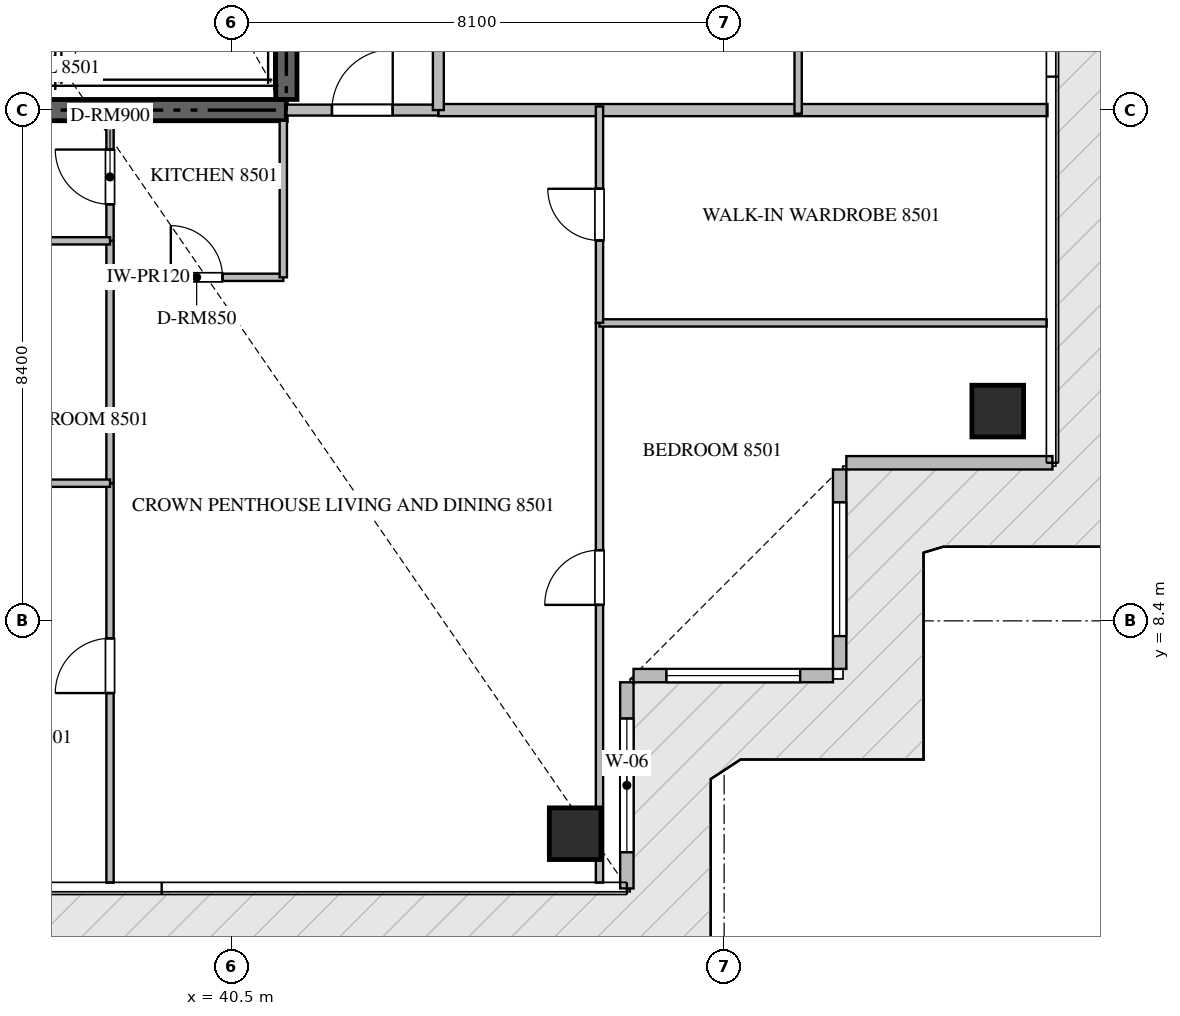
"""IFC4 building model, lengths in metres.
Left out: names, types, materials, properties, quantities, classifications, styles, units other than length and angle.
Written with IfcOpenShell. Run it as: python <this file> out.ifc"""

import sys

from ifc_helpers import new_model, si_unit, direction, frame, frame_2d, origin, origin_2d, place, context, subcontext, project, spatial, rectangle, extrude, source, transform, mapped, element, fill, save


model = new_model("IFC4")
c1 = context("Model", 3, precision=1e-05, world=origin(), true_north=direction((0.0, 1.0)))
c2 = subcontext(c1, "Body", "Model", "MODEL_VIEW")
j1 = project(units=[si_unit("LENGTHUNIT", "METRE"), si_unit("PLANEANGLEUNIT", "RADIAN")], contexts=[c1])
p1 = place(None, origin())
s1 = spatial("IfcSite", under=j1, at=p1, CompositionType="ELEMENT")
p2 = place(p1, origin())
s2 = spatial("IfcBuilding", under=s1, at=p2, CompositionType="ELEMENT")
p3 = place(p2, frame((0.0, 0.0, 342.05)))
s3 = spatial("IfcBuildingStorey", under=s2, at=p3, CompositionType="ELEMENT", Elevation=342.05)
p4 = place(p3, frame((23.4, 16.8, -0.26), z_axis=(0.0, 0.0, 1.0), x_axis=(1.0, 0.0, 0.0)))
e1 = element("IfcWall", 1, at=p4, inside=s3, PredefinedType="SHEAR", context=c2, shape_type="SweptSolid", body=[
    extrude(rectangle(XDim=18.0, YDim=0.35, at=frame_2d((9.0, 0.0))), origin(), (0.0, 0.0, 1.0), 5.898),
])
p5 = place(p3, frame((41.4, 16.975, -0.26), z_axis=(0.0, 0.0, 1.0), x_axis=(0.0, 1.0, 0.0)))
e2 = element("IfcWall", 2, at=p5, inside=s3, PredefinedType="SHEAR", context=c2, shape_type="SweptSolid", body=[
    extrude(rectangle(XDim=8.375, YDim=0.35, at=frame_2d((4.188, 0.0))), origin(), (0.0, 0.0, 1.0), 5.898),
])
m1 = source(origin(), c2, "Body", "SweptSolid", [
    extrude(rectangle(XDim=0.85, YDim=0.85, at=origin_2d()), origin(), (0.0, 0.0, 1.0), 5.9),
])
for number, where, z_axis, x_axis in (
    (3, (46.15, 4.9, -0.26), (0.0, 0.0, 1.0), (1.0, 0.0, 0.0)),
    (4, (53.1, 11.85, -0.26), (0.0, 0.0, 1.0), (1.0, 0.0, 0.0)),
):
    element("IfcColumn", number, at=place(p3, frame(where, z_axis=z_axis, x_axis=x_axis)), inside=s3, PredefinedType="COLUMN", context=c2, shape_type="MappedRepresentation", body=[
        mapped(m1, transform((0.0, 0.0, 0.0), scale=1.0)),
    ])
p6 = place(p3, frame((47.0, 4.0, 0.0), z_axis=(0.0, 0.0, 1.0), x_axis=(0.0, 1.0, 0.0)))
e5 = element("IfcWall", 5, at=p6, inside=s3, PredefinedType="ELEMENTEDWALL", context=c2, shape_type="SweptSolid", body=[
    extrude(rectangle(XDim=3.39, YDim=0.22, at=frame_2d((1.695, 0.0))), origin(), (0.0, 0.0, 1.0), 5.625),
])
p7 = place(p6, frame((0.595, 0.0, 0.65)))
e6 = element("IfcOpeningElement", 6, at=p7, cuts=e5, PredefinedType="OPENING", context=c2, shape_type="SweptSolid", body=[
    extrude(rectangle(XDim=2.2, YDim=2.4, at=frame_2d((1.1, 1.2))), frame((0.0, 0.12, 0.0), z_axis=(0.0, -1.0, 0.0), x_axis=(1.0, 0.0, 0.0)), (0.0, 0.0, 1.0), 0.24),
])
p8 = place(p3, frame((47.11, 7.5, 0.0), z_axis=(0.0, 0.0, 1.0), x_axis=(1.0, 0.0, 0.0)))
e7 = element("IfcWall", 7, at=p8, inside=s3, PredefinedType="ELEMENTEDWALL", context=c2, shape_type="SweptSolid", body=[
    extrude(rectangle(XDim=3.28, YDim=0.22, at=frame_2d((1.64, 0.0))), origin(), (0.0, 0.0, 1.0), 5.625),
])
p9 = place(p8, frame((0.54, 0.0, 0.65)))
e8 = element("IfcOpeningElement", 8, at=p9, cuts=e7, PredefinedType="OPENING", context=c2, shape_type="SweptSolid", body=[
    extrude(rectangle(XDim=2.2, YDim=2.4, at=frame_2d((1.1, 1.2))), frame((0.0, 0.12, 0.0), z_axis=(0.0, -1.0, 0.0), x_axis=(1.0, 0.0, 0.0)), (0.0, 0.0, 1.0), 0.24),
])
p10 = place(p3, frame((50.5, 7.61, 0.0), z_axis=(0.0, 0.0, 1.0), x_axis=(0.0, 1.0, 0.0)))
e9 = element("IfcWall", 9, at=p10, inside=s3, PredefinedType="ELEMENTEDWALL", context=c2, shape_type="SweptSolid", body=[
    extrude(rectangle(XDim=3.28, YDim=0.22, at=frame_2d((1.64, 0.0))), origin(), (0.0, 0.0, 1.0), 5.625),
])
p11 = place(p10, frame((0.54, 0.0, 0.65)))
e10 = element("IfcOpeningElement", 10, at=p11, cuts=e9, PredefinedType="OPENING", context=c2, shape_type="SweptSolid", body=[
    extrude(rectangle(XDim=2.2, YDim=2.4, at=frame_2d((1.1, 1.2))), frame((0.0, 0.12, 0.0), z_axis=(0.0, -1.0, 0.0), x_axis=(1.0, 0.0, 0.0)), (0.0, 0.0, 1.0), 0.24),
])
p12 = place(p3, frame((50.61, 11.0, 0.0), z_axis=(0.0, 0.0, 1.0), x_axis=(1.0, 0.0, 0.0)))
e11 = element("IfcWall", 11, at=p12, inside=s3, PredefinedType="ELEMENTEDWALL", context=c2, shape_type="SweptSolid", body=[
    extrude(rectangle(XDim=3.39, YDim=0.22, at=frame_2d((1.695, 0.0))), origin(), (0.0, 0.0, 1.0), 5.625),
])
p13 = place(p3, frame((43.9, 16.8, 0.0), z_axis=(0.0, 0.0, 1.0), x_axis=(1.0, 0.0, 0.0)))
e12 = element("IfcWall", 12, at=p13, inside=s3, PredefinedType="PARTITIONING", context=c2, shape_type="SweptSolid", body=[
    extrude(rectangle(XDim=10.018, YDim=0.2, at=frame_2d((5.009, 0.0))), origin(), (0.0, 0.0, 1.0), 5.64),
])
p14 = place(p3, frame((41.402, 16.8, 0.0), z_axis=(0.0, 0.0, 1.0), x_axis=(1.0, 0.0, 0.0)))
e13 = element("IfcWall", 13, at=p14, inside=s3, PredefinedType="PARTITIONING", context=c2, shape_type="SweptSolid", body=[
    extrude(rectangle(XDim=2.496, YDim=0.18, at=frame_2d((1.248, 0.0))), origin(), (0.0, 0.0, 1.0), 5.64),
])
p15 = place(p14, frame((0.748, 0.0, 0.0)))
e14 = element("IfcOpeningElement", 14, at=p15, cuts=e13, PredefinedType="OPENING", context=c2, shape_type="SweptSolid", body=[
    extrude(rectangle(XDim=1.0, YDim=2.15, at=frame_2d((0.5, 1.075))), frame((0.0, 0.1, 0.0), z_axis=(0.0, -1.0, 0.0), x_axis=(1.0, 0.0, 0.0)), (0.0, 0.0, 1.0), 0.2),
])
p16 = place(p3, frame((43.9, 16.8, 0.0), z_axis=(0.0, 0.0, 1.0), x_axis=(0.0, 1.0, 0.0)))
e15 = element("IfcWall", 15, at=p16, inside=s3, PredefinedType="PARTITIONING", context=c2, shape_type="SweptSolid", body=[
    extrude(rectangle(XDim=16.8, YDim=0.18, at=frame_2d((8.4, 0.0))), origin(), (0.0, 0.0, 1.0), 5.64),
])
p17 = place(p16, frame((14.5, 0.0, 0.0)))
e16 = element("IfcOpeningElement", 16, at=p17, cuts=e15, PredefinedType="OPENING", context=c2, shape_type="SweptSolid", body=[
    extrude(rectangle(XDim=1.0, YDim=2.15, at=frame_2d((0.5, 1.075))), frame((0.0, 0.1, 0.0), z_axis=(0.0, -1.0, 0.0), x_axis=(1.0, 0.0, 0.0)), (0.0, 0.0, 1.0), 0.2),
])
p18 = place(p3, frame((38.5, 14.05, 0.0), z_axis=(0.0, 0.0, 1.0), x_axis=(1.0, 0.0, 0.0)))
e17 = element("IfcWall", 17, at=p18, inside=s3, PredefinedType="PARTITIONING", context=c2, shape_type="SweptSolid", body=[
    extrude(rectangle(XDim=2.85, YDim=0.12, at=frame_2d((1.425, 0.0))), origin(), (0.0, 0.0, 1.0), 5.64),
])
p19 = place(p18, frame((1.0, 0.0, 0.0)))
e18 = element("IfcOpeningElement", 18, at=p19, cuts=e17, PredefinedType="OPENING", context=c2, shape_type="SweptSolid", body=[
    extrude(rectangle(XDim=0.85, YDim=2.1, at=frame_2d((0.425, 1.05))), frame((0.0, 0.07, 0.0), z_axis=(0.0, -1.0, 0.0), x_axis=(1.0, 0.0, 0.0)), (0.0, 0.0, 1.0), 0.14),
])
p20 = place(p3, frame((41.35, 14.05, 0.0), z_axis=(0.0, 0.0, 1.0), x_axis=(0.0, 1.0, 0.0)))
e19 = element("IfcWall", 19, at=p20, inside=s3, PredefinedType="PARTITIONING", context=c2, shape_type="SweptSolid", body=[
    extrude(rectangle(XDim=2.575, YDim=0.12, at=frame_2d((1.288, 0.0))), origin(), (0.0, 0.0, 1.0), 5.64),
])
p21 = place(p3, frame((38.5, 14.65, 0.0), z_axis=(0.0, 0.0, 1.0), x_axis=(0.0, 1.0, 0.0)))
e20 = element("IfcWall", 20, at=p21, inside=s3, PredefinedType="PARTITIONING", context=c2, shape_type="SweptSolid", body=[
    extrude(rectangle(XDim=1.975, YDim=0.12, at=frame_2d((0.988, 0.0))), origin(), (0.0, 0.0, 1.0), 5.64),
])
p22 = place(p21, frame((0.601, 0.0, 0.0)))
e21 = element("IfcOpeningElement", 21, at=p22, cuts=e20, PredefinedType="OPENING", context=c2, shape_type="SweptSolid", body=[
    extrude(rectangle(XDim=0.9, YDim=2.1, at=frame_2d((0.45, 1.05))), frame((0.0, 0.07, 0.0), z_axis=(0.0, -1.0, 0.0), x_axis=(1.0, 0.0, 0.0)), (0.0, 0.0, 1.0), 0.14),
])
p23 = place(p3, frame((38.5, 4.095, 0.0), z_axis=(0.0, 0.0, 1.0), x_axis=(0.0, 1.0, 0.0)))
e22 = element("IfcWall", 22, at=p23, inside=s3, PredefinedType="PARTITIONING", context=c2, shape_type="SweptSolid", body=[
    extrude(rectangle(XDim=6.569, YDim=0.12, at=frame_2d((3.285, 0.0))), origin(), (0.0, 0.0, 1.0), 5.64),
])
p24 = place(p23, frame((3.118, 0.0, 0.0)))
e23 = element("IfcOpeningElement", 23, at=p24, cuts=e22, PredefinedType="OPENING", context=c2, shape_type="SweptSolid", body=[
    extrude(rectangle(XDim=0.9, YDim=2.1, at=frame_2d((0.45, 1.05))), frame((0.0, 0.07, 0.0), z_axis=(0.0, -1.0, 0.0), x_axis=(1.0, 0.0, 0.0)), (0.0, 0.0, 1.0), 0.14),
])
p25 = place(p3, frame((38.5, 10.666, 0.0), z_axis=(0.0, 0.0, 1.0), x_axis=(0.0, 1.0, 0.0)))
e24 = element("IfcWall", 24, at=p25, inside=s3, PredefinedType="PARTITIONING", context=c2, shape_type="SweptSolid", body=[
    extrude(rectangle(XDim=3.982, YDim=0.12, at=frame_2d((1.991, 0.0))), origin(), (0.0, 0.0, 1.0), 5.64),
])
p26 = place(p3, frame((33.35, 10.664, 0.0), z_axis=(0.0, 0.0, 1.0), x_axis=(1.0, 0.0, 0.0)))
e25 = element("IfcWall", 25, at=p26, inside=s3, PredefinedType="PARTITIONING", context=c2, shape_type="SweptSolid", body=[
    extrude(rectangle(XDim=5.15, YDim=0.12, at=frame_2d((2.575, 0.0))), origin(), (0.0, 0.0, 1.0), 5.64),
])
p27 = place(p3, frame((35.515, 14.65, 0.0), z_axis=(0.0, 0.0, 1.0), x_axis=(1.0, 0.0, 0.0)))
e26 = element("IfcWall", 26, at=p27, inside=s3, PredefinedType="PARTITIONING", context=c2, shape_type="SweptSolid", body=[
    extrude(rectangle(XDim=2.985, YDim=0.12, at=frame_2d((1.493, 0.0))), origin(), (0.0, 0.0, 1.0), 5.64),
])
p28 = place(p27, frame((1.067, 0.0, 0.0)))
e27 = element("IfcOpeningElement", 27, at=p28, cuts=e26, PredefinedType="OPENING", context=c2, shape_type="SweptSolid", body=[
    extrude(rectangle(XDim=0.85, YDim=2.1, at=frame_2d((0.425, 1.05))), frame((0.0, 0.07, 0.0), z_axis=(0.0, -1.0, 0.0), x_axis=(1.0, 0.0, 0.0)), (0.0, 0.0, 1.0), 0.14),
])
p29 = place(p3, frame((46.55, 4.095, 0.0), z_axis=(0.0, 0.0, 1.0), x_axis=(0.0, 1.0, 0.0)))
e28 = element("IfcWall", 28, at=p29, inside=s3, PredefinedType="PARTITIONING", context=c2, shape_type="SweptSolid", body=[
    extrude(rectangle(XDim=9.205, YDim=0.12, at=frame_2d((4.603, 0.0))), origin(), (0.0, 0.0, 1.0), 5.64),
])
p30 = place(p29, frame((4.568, 0.0, 0.0)))
e29 = element("IfcOpeningElement", 29, at=p30, cuts=e28, PredefinedType="OPENING", context=c2, shape_type="SweptSolid", body=[
    extrude(rectangle(XDim=0.9, YDim=2.1, at=frame_2d((0.45, 1.05))), frame((0.0, 0.07, 0.0), z_axis=(0.0, -1.0, 0.0), x_axis=(1.0, 0.0, 0.0)), (0.0, 0.0, 1.0), 0.14),
])
p31 = place(p3, frame((46.55, 13.3, 0.0), z_axis=(0.0, 0.0, 1.0), x_axis=(1.0, 0.0, 0.0)))
e30 = element("IfcWall", 30, at=p31, inside=s3, PredefinedType="PARTITIONING", context=c2, shape_type="SweptSolid", body=[
    extrude(rectangle(XDim=7.355, YDim=0.12, at=frame_2d((3.677, 0.0))), origin(), (0.0, 0.0, 1.0), 5.64),
])
p32 = place(p3, frame((46.55, 13.302, 0.0), z_axis=(0.0, 0.0, 1.0), x_axis=(0.0, 1.0, 0.0)))
e31 = element("IfcWall", 31, at=p32, inside=s3, PredefinedType="PARTITIONING", context=c2, shape_type="SweptSolid", body=[
    extrude(rectangle(XDim=3.558, YDim=0.12, at=frame_2d((1.779, 0.0))), origin(), (0.0, 0.0, 1.0), 5.64),
])
p33 = place(p32, frame((1.354, 0.0, 0.0)))
e32 = element("IfcOpeningElement", 32, at=p33, cuts=e31, PredefinedType="OPENING", context=c2, shape_type="SweptSolid", body=[
    extrude(rectangle(XDim=0.85, YDim=2.1, at=frame_2d((0.425, 1.05))), frame((0.0, 0.07, 0.0), z_axis=(0.0, -1.0, 0.0), x_axis=(1.0, 0.0, 0.0)), (0.0, 0.0, 1.0), 0.14),
])
p34 = place(p3, frame((49.817, 16.74, 0.0), z_axis=(0.0, 0.0, 1.0), x_axis=(0.0, 1.0, 0.0)))
e33 = element("IfcWall", 33, at=p34, inside=s3, PredefinedType="PARTITIONING", context=c2, shape_type="SweptSolid", body=[
    extrude(rectangle(XDim=10.48, YDim=0.12, at=frame_2d((5.24, 0.0))), origin(), (0.0, 0.0, 1.0), 5.64),
])
m2 = source(origin(), c2, "Body", "SweptSolid", [
    extrude(rectangle(XDim=2.2, YDim=2.4, at=frame_2d((1.1, 1.2))), frame((0.0, 0.03, 0.0), z_axis=(0.0, -1.0, 0.0), x_axis=(1.0, 0.0, 0.0)), (0.0, 0.0, 1.0), 0.06),
])
p35 = place(p7, origin())
e34 = element("IfcWindow", 34, at=p35, inside=s3, PartitioningType="SINGLE_PANEL", PredefinedType="WINDOW", context=c2, shape_type="MappedRepresentation", body=[
    mapped(m2, transform((0.0, 0.0, 0.0), scale=1.0)),
])
fill(e6, e34)
p36 = place(p9, origin())
e35 = element("IfcWindow", 35, at=p36, inside=s3, PartitioningType="SINGLE_PANEL", PredefinedType="WINDOW", context=c2, shape_type="MappedRepresentation", body=[
    mapped(m2, transform((0.0, 0.0, 0.0), scale=1.0)),
])
fill(e8, e35)
p37 = place(p11, origin())
e36 = element("IfcWindow", 36, at=p37, inside=s3, PartitioningType="SINGLE_PANEL", PredefinedType="WINDOW", context=c2, shape_type="MappedRepresentation", body=[
    mapped(m2, transform((0.0, 0.0, 0.0), scale=1.0)),
])
fill(e10, e36)
m3 = source(origin(), c2, "Body", "SweptSolid", [
    extrude(rectangle(XDim=1.0, YDim=2.15, at=frame_2d((0.5, 1.075))), frame((0.0, 0.025, 0.0), z_axis=(0.0, -1.0, 0.0), x_axis=(1.0, 0.0, 0.0)), (0.0, 0.0, 1.0), 0.05),
])
p38 = place(p15, origin())
e37 = element("IfcDoor", 37, at=p38, inside=s3, OperationType="SINGLE_SWING_RIGHT", PredefinedType="DOOR", context=c2, shape_type="MappedRepresentation", body=[
    mapped(m3, transform((0.0, 0.0, 0.0), scale=1.0)),
])
fill(e14, e37)
m4 = source(origin(), c2, "Body", "SweptSolid", [
    extrude(rectangle(XDim=0.85, YDim=2.1, at=frame_2d((0.425, 1.05))), frame((0.0, 0.025, 0.0), z_axis=(0.0, -1.0, 0.0), x_axis=(1.0, 0.0, 0.0)), (0.0, 0.0, 1.0), 0.05),
])
p39 = place(p19, origin())
e38 = element("IfcDoor", 38, at=p39, inside=s3, OperationType="SINGLE_SWING_LEFT", PredefinedType="DOOR", context=c2, shape_type="MappedRepresentation", body=[
    mapped(m4, transform((0.0, 0.0, 0.0), scale=1.0)),
])
fill(e18, e38)
m5 = source(origin(), c2, "Body", "SweptSolid", [
    extrude(rectangle(XDim=0.9, YDim=2.1, at=frame_2d((0.45, 1.05))), frame((0.0, 0.025, 0.0), z_axis=(0.0, -1.0, 0.0), x_axis=(1.0, 0.0, 0.0)), (0.0, 0.0, 1.0), 0.05),
])
p40 = place(p22, origin())
e39 = element("IfcDoor", 39, at=p40, inside=s3, OperationType="SINGLE_SWING_RIGHT", PredefinedType="DOOR", context=c2, shape_type="MappedRepresentation", body=[
    mapped(m5, transform((0.0, 0.0, 0.0), scale=1.0)),
])
fill(e21, e39)
p41 = place(p24, origin())
e40 = element("IfcDoor", 40, at=p41, inside=s3, OperationType="SINGLE_SWING_LEFT", PredefinedType="DOOR", context=c2, shape_type="MappedRepresentation", body=[
    mapped(m5, transform((0.0, 0.0, 0.0), scale=1.0)),
])
fill(e23, e40)
p42 = place(p30, origin())
e41 = element("IfcDoor", 41, at=p42, inside=s3, OperationType="SINGLE_SWING_LEFT", PredefinedType="DOOR", context=c2, shape_type="MappedRepresentation", body=[
    mapped(m5, transform((0.0, 0.0, 0.0), scale=1.0)),
])
fill(e29, e41)
p43 = place(p33, origin())
e42 = element("IfcDoor", 42, at=p43, inside=s3, OperationType="SINGLE_SWING_RIGHT", PredefinedType="DOOR", context=c2, shape_type="MappedRepresentation", body=[
    mapped(m4, transform((0.0, 0.0, 0.0), scale=1.0)),
])
fill(e32, e42)
save(model, sys.argv[1])
